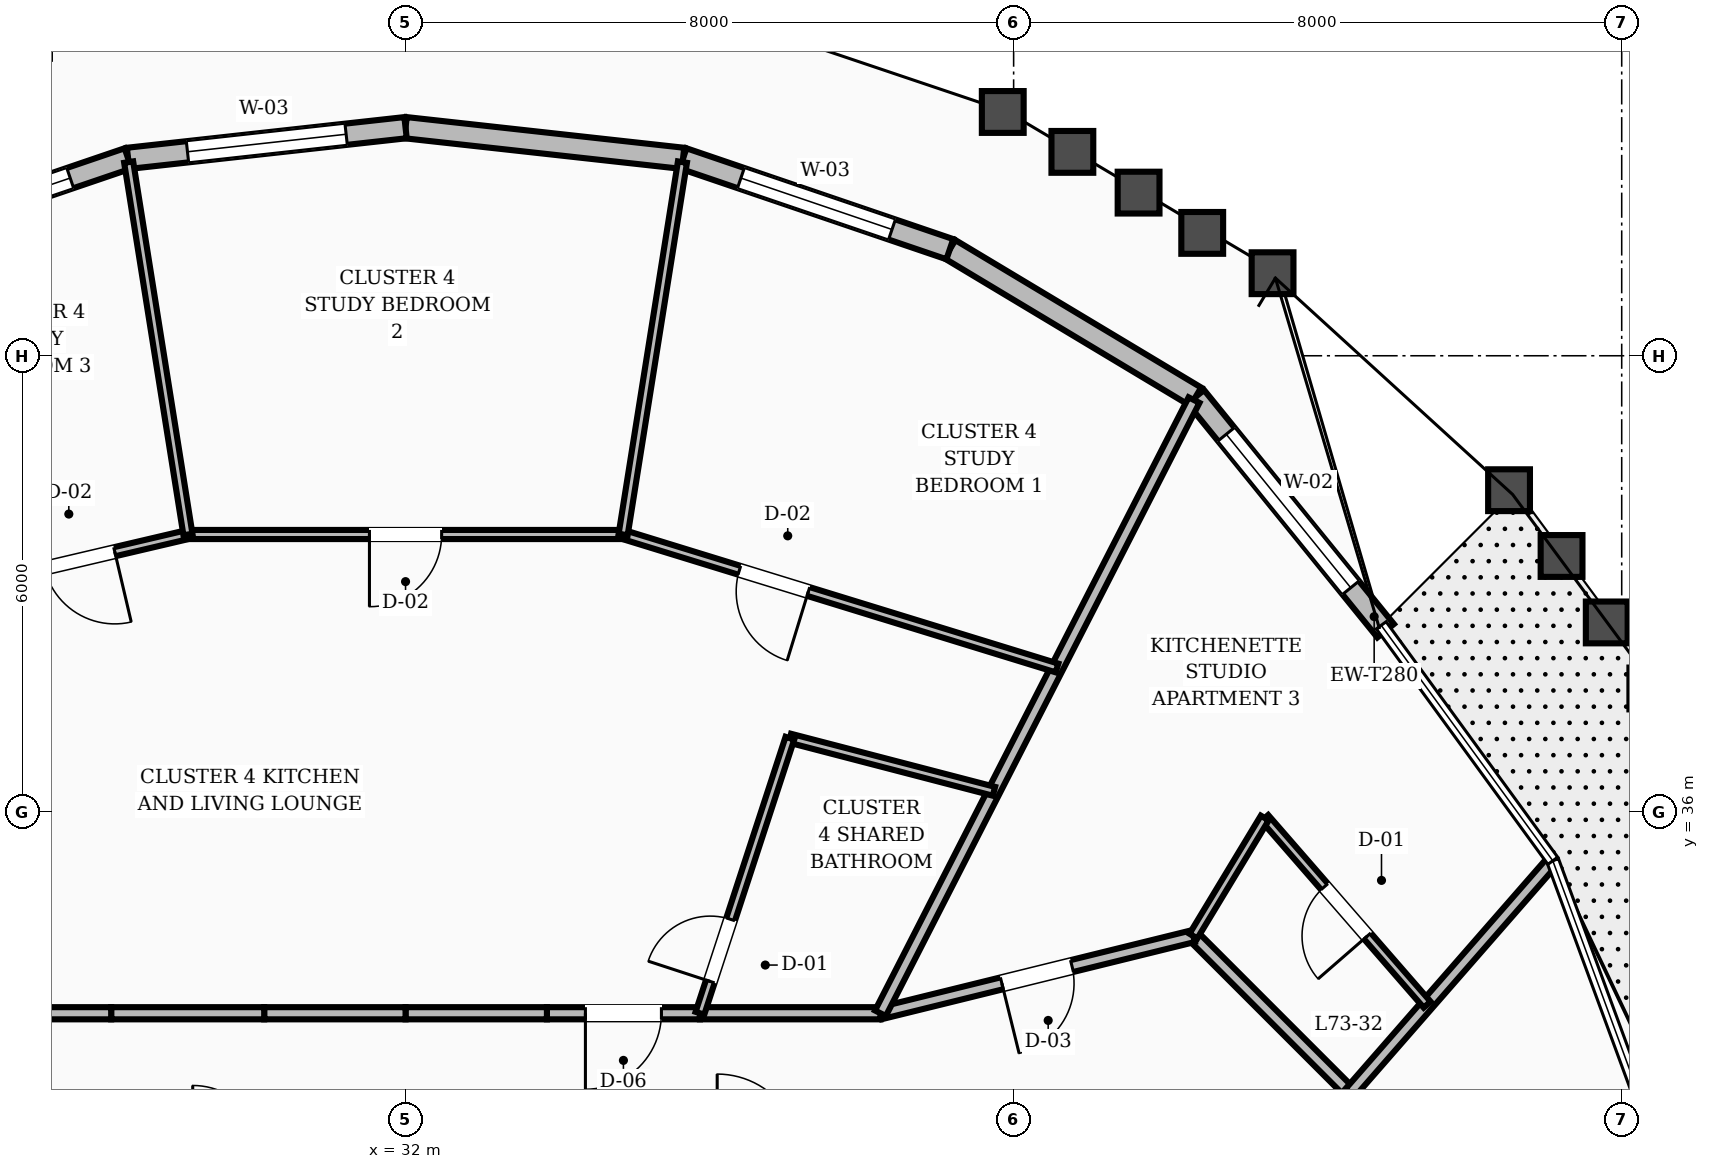
"""IFC4 building model, lengths in metres.
Left out: names, types, materials, properties, quantities, classifications, styles, units other than length and angle.
Written with IfcOpenShell. Run it as: python <this file> out.ifc"""

import sys

from ifc_helpers import new_model, si_unit, direction, frame, frame_2d, origin, place, context, subcontext, project, spatial, rectangle, extrude, element, fill, save


model = new_model("IFC4")
c1 = context("Model", 3, precision=1e-05, world=origin(), true_north=direction((0.0, 1.0)))
c2 = subcontext(c1, "Body", "Model", "MODEL_VIEW")
j1 = project(units=[si_unit("LENGTHUNIT", "METRE"), si_unit("PLANEANGLEUNIT", "RADIAN")], contexts=[c1])
p1 = place(None, origin())
s1 = spatial("IfcSite", under=j1, at=p1, CompositionType="ELEMENT")
p2 = place(p1, origin())
s2 = spatial("IfcBuilding", under=s1, at=p2, CompositionType="ELEMENT")
p3 = place(p2, frame((0.0, 0.0, 279.6)))
s3 = spatial("IfcBuildingStorey", under=s2, at=p3, CompositionType="ELEMENT", Elevation=279.6)
p4 = place(p3, frame((44.894, 38.382, 0.0), z_axis=(0.0, 0.0, 1.0), x_axis=(-0.629952569376, 0.776633607524, 0.0)))
e1 = element("IfcWall", 1, at=p4, inside=s3, PredefinedType="STANDARD", context=c2, shape_type="SweptSolid", body=[
    extrude(rectangle(XDim=3.965, YDim=0.28, at=frame_2d((1.982, 0.0))), origin(), (0.0, 0.0, 1.0), 2.88),
])
p5 = place(p4, frame((0.729, 0.0, 0.8)))
e2 = element("IfcOpeningElement", 2, at=p5, cuts=e1, PredefinedType="OPENING", context=c2, shape_type="SweptSolid", body=[
    extrude(rectangle(XDim=2.6, YDim=1.65, at=frame_2d((1.3, 0.825))), frame((0.0, 0.15, 0.0), z_axis=(0.0, -1.0, 0.0), x_axis=(1.0, 0.0, 0.0)), (0.0, 0.0, 1.0), 0.3),
])
p6 = place(p3, frame((42.396, 41.461, 0.0), z_axis=(0.0, 0.0, 1.0), x_axis=(-0.857555727465, 0.514391071357, 0.0)))
e3 = element("IfcWall", 3, at=p6, inside=s3, PredefinedType="STANDARD", context=c2, shape_type="SweptSolid", body=[
    extrude(rectangle(XDim=3.773, YDim=0.28, at=frame_2d((1.886, 0.0))), origin(), (0.0, 0.0, 1.0), 2.88),
])
p7 = place(p3, frame((39.161, 43.402, 0.0), z_axis=(0.0, 0.0, 1.0), x_axis=(-0.946642640744, 0.322285138854, 0.0)))
e4 = element("IfcWall", 4, at=p7, inside=s3, PredefinedType="STANDARD", context=c2, shape_type="SweptSolid", body=[
    extrude(rectangle(XDim=3.708, YDim=0.28, at=frame_2d((1.854, 0.0))), origin(), (0.0, 0.0, 1.0), 2.88),
])
p8 = place(p7, frame((0.804, 0.0, 0.8)))
e5 = element("IfcOpeningElement", 5, at=p8, cuts=e4, PredefinedType="OPENING", context=c2, shape_type="SweptSolid", body=[
    extrude(rectangle(XDim=2.1, YDim=1.65, at=frame_2d((1.05, 0.825))), frame((0.0, 0.15, 0.0), z_axis=(0.0, -1.0, 0.0), x_axis=(1.0, 0.0, 0.0)), (0.0, 0.0, 1.0), 0.3),
])
p9 = place(p3, frame((35.651, 44.597, 0.0), z_axis=(0.0, 0.0, 1.0), x_axis=(-0.993952444877, 0.10981137156, 0.0)))
e6 = element("IfcWall", 6, at=p9, inside=s3, PredefinedType="STANDARD", context=c2, shape_type="SweptSolid", body=[
    extrude(rectangle(XDim=3.673, YDim=0.28, at=frame_2d((1.836, 0.0))), origin(), (0.0, 0.0, 1.0), 2.88),
])
p10 = place(p3, frame((32.0, 45.0, 0.0), z_axis=(0.0, 0.0, 1.0), x_axis=(-0.993952444877, -0.10981137156, 0.0)))
e7 = element("IfcWall", 7, at=p10, inside=s3, PredefinedType="STANDARD", context=c2, shape_type="SweptSolid", body=[
    extrude(rectangle(XDim=3.673, YDim=0.28, at=frame_2d((1.836, 0.0))), origin(), (0.0, 0.0, 1.0), 2.88),
])
p11 = place(p10, frame((0.787, 0.0, 0.8)))
e8 = element("IfcOpeningElement", 8, at=p11, cuts=e7, PredefinedType="OPENING", context=c2, shape_type="SweptSolid", body=[
    extrude(rectangle(XDim=2.1, YDim=1.65, at=frame_2d((1.05, 0.825))), frame((0.0, 0.15, 0.0), z_axis=(0.0, -1.0, 0.0), x_axis=(1.0, 0.0, 0.0)), (0.0, 0.0, 1.0), 0.3),
])
p12 = place(p3, frame((28.349, 44.597, 0.0), z_axis=(0.0, 0.0, 1.0), x_axis=(-0.946642640744, -0.322285138854, 0.0)))
e9 = element("IfcWall", 9, at=p12, inside=s3, PredefinedType="STANDARD", context=c2, shape_type="SweptSolid", body=[
    extrude(rectangle(XDim=3.708, YDim=0.28, at=frame_2d((1.854, 0.0))), origin(), (0.0, 0.0, 1.0), 2.88),
])
p13 = place(p12, frame((0.804, 0.0, 0.8)))
e10 = element("IfcOpeningElement", 10, at=p13, cuts=e9, PredefinedType="OPENING", context=c2, shape_type="SweptSolid", body=[
    extrude(rectangle(XDim=2.1, YDim=1.65, at=frame_2d((1.05, 0.825))), frame((0.0, 0.15, 0.0), z_axis=(0.0, -1.0, 0.0), x_axis=(1.0, 0.0, 0.0)), (0.0, 0.0, 1.0), 0.3),
])
p14 = place(p3, frame((44.427, 32.303, 0.0), z_axis=(0.0, 0.0, 1.0), x_axis=(-0.707106781187, 0.707106781187, 0.0)))
e11 = element("IfcWall", 11, at=p14, inside=s3, PredefinedType="SOLIDWALL", context=c2, shape_type="SweptSolid", body=[
    extrude(rectangle(XDim=2.916, YDim=0.16, at=frame_2d((1.458, 0.0))), origin(), (0.0, 0.0, 1.0), 2.87),
])
p15 = place(p3, frame((42.365, 34.365, 0.0), z_axis=(0.0, 0.0, 1.0), x_axis=(-0.970939799552, -0.239323850978, 0.0)))
e12 = element("IfcWall", 12, at=p15, inside=s3, PredefinedType="SOLIDWALL", context=c2, shape_type="SweptSolid", body=[
    extrude(rectangle(XDim=4.241, YDim=0.16, at=frame_2d((2.12, 0.0))), origin(), (0.0, 0.0, 1.0), 2.87),
])
p16 = place(p15, frame((1.646, 0.0, 0.0)))
e13 = element("IfcOpeningElement", 13, at=p16, cuts=e12, PredefinedType="OPENING", context=c2, shape_type="SweptSolid", body=[
    extrude(rectangle(XDim=0.95, YDim=2.1, at=frame_2d((0.475, 1.05))), frame((0.0, 0.09, 0.0), z_axis=(0.0, -1.0, 0.0), x_axis=(1.0, 0.0, 0.0)), (0.0, 0.0, 1.0), 0.18),
])
p17 = place(p3, frame((38.248, 33.35, 0.0), z_axis=(0.0, 0.0, 1.0), x_axis=(-1.0, 0.0, 0.0)))
e14 = element("IfcWall", 14, at=p17, inside=s3, PredefinedType="SOLIDWALL", context=c2, shape_type="SweptSolid", body=[
    extrude(rectangle(XDim=2.375, YDim=0.16, at=frame_2d((1.188, 0.0))), origin(), (0.0, 0.0, 1.0), 2.87),
])
p18 = place(p3, frame((35.873, 33.35, 0.0), z_axis=(0.0, 0.0, 1.0), x_axis=(-1.0, 0.0, 0.0)))
e15 = element("IfcWall", 15, at=p18, inside=s3, PredefinedType="SOLIDWALL", context=c2, shape_type="SweptSolid", body=[
    extrude(rectangle(XDim=2.013, YDim=0.16, at=frame_2d((1.006, 0.0))), origin(), (0.0, 0.0, 1.0), 2.87),
])
p19 = place(p18, frame((0.507, 0.0, 0.0)))
e16 = element("IfcOpeningElement", 16, at=p19, cuts=e15, PredefinedType="OPENING", context=c2, shape_type="SweptSolid", body=[
    extrude(rectangle(XDim=1.0, YDim=2.1, at=frame_2d((0.5, 1.05))), frame((0.0, 0.09, 0.0), z_axis=(0.0, -1.0, 0.0), x_axis=(1.0, 0.0, 0.0)), (0.0, 0.0, 1.0), 0.18),
])
for number, where, z_axis, x_axis in (
    (17, (33.86, 33.35, 0.0), (0.0, 0.0, 1.0), (-1.0, 0.0, 0.0)),
    (18, (32.0, 33.35, 0.0), (0.0, 0.0, 1.0), (-1.0, 0.0, 0.0)),
):
    element("IfcWall", number, at=place(p3, frame(where, z_axis=z_axis, x_axis=x_axis)), inside=s3, PredefinedType="SOLIDWALL", context=c2, shape_type="SweptSolid", body=[
        extrude(rectangle(XDim=1.86, YDim=0.16, at=frame_2d((0.93, 0.0))), origin(), (0.0, 0.0, 1.0), 2.87),
    ])
p20 = place(p3, frame((30.14, 33.35, 0.0), z_axis=(0.0, 0.0, 1.0), x_axis=(-1.0, 0.0, 0.0)))
e19 = element("IfcWall", 19, at=p20, inside=s3, PredefinedType="SOLIDWALL", context=c2, shape_type="SweptSolid", body=[
    extrude(rectangle(XDim=2.013, YDim=0.16, at=frame_2d((1.006, 0.0))), origin(), (0.0, 0.0, 1.0), 2.87),
])
p21 = place(p3, frame((28.127, 33.35, 0.0), z_axis=(0.0, 0.0, 1.0), x_axis=(-1.0, 0.0, 0.0)))
e20 = element("IfcWall", 20, at=p21, inside=s3, PredefinedType="SOLIDWALL", context=c2, shape_type="SweptSolid", body=[
    extrude(rectangle(XDim=2.375, YDim=0.16, at=frame_2d((1.188, 0.0))), origin(), (0.0, 0.0, 1.0), 2.87),
])
p22 = place(p3, frame((44.427, 32.303, 0.0), z_axis=(0.0, 0.0, 1.0), x_axis=(0.657843835953, 0.753154358348, 0.0)))
e21 = element("IfcWall", 21, at=p22, inside=s3, PredefinedType="SOLIDWALL", context=c2, shape_type="SweptSolid", body=[
    extrude(rectangle(XDim=4.004, YDim=0.16, at=frame_2d((2.002, 0.0))), origin(), (0.0, 0.0, 1.0), 2.87),
])
p23 = place(p3, frame((45.44, 33.463, 0.0), z_axis=(0.0, 0.0, 1.0), x_axis=(-0.656340285245, 0.754464995851, 0.0)))
e22 = element("IfcWall", 22, at=p23, inside=s3, PredefinedType="PARTITIONING", context=c2, shape_type="SweptSolid", body=[
    extrude(rectangle(XDim=3.254, YDim=0.12, at=frame_2d((1.627, 0.0))), origin(), (0.0, 0.0, 1.0), 2.87),
])
p24 = place(p23, frame((1.197, 0.0, 0.0)))
e23 = element("IfcOpeningElement", 23, at=p24, cuts=e22, PredefinedType="OPENING", context=c2, shape_type="SweptSolid", body=[
    extrude(rectangle(XDim=0.86, YDim=2.1, at=frame_2d((0.43, 1.05))), frame((0.0, 0.07, 0.0), z_axis=(0.0, -1.0, 0.0), x_axis=(1.0, 0.0, 0.0)), (0.0, 0.0, 1.0), 0.14),
])
p25 = place(p3, frame((42.365, 34.365, 0.0), z_axis=(0.0, 0.0, 1.0), x_axis=(0.517222367242, 0.855851051775, 0.0)))
e24 = element("IfcWall", 24, at=p25, inside=s3, PredefinedType="PARTITIONING", context=c2, shape_type="SweptSolid", body=[
    extrude(rectangle(XDim=1.815, YDim=0.12, at=frame_2d((0.908, 0.0))), origin(), (0.0, 0.0, 1.0), 2.87),
])
p26 = place(p3, frame((38.248, 33.35, 0.0), z_axis=(0.0, 0.0, 1.0), x_axis=(0.455343199474, 0.890315994854, 0.0)))
e25 = element("IfcWall", 25, at=p26, inside=s3, PredefinedType="SOLIDWALL", context=c2, shape_type="SweptSolid", body=[
    extrude(rectangle(XDim=9.061, YDim=0.16, at=frame_2d((4.53, 0.0))), origin(), (0.0, 0.0, 1.0), 2.87),
])
p27 = place(p3, frame((39.741, 36.27, 0.0), z_axis=(0.0, 0.0, 1.0), x_axis=(-0.967751731416, 0.251905907714, 0.0)))
e26 = element("IfcWall", 26, at=p27, inside=s3, PredefinedType="PARTITIONING", context=c2, shape_type="SweptSolid", body=[
    extrude(rectangle(XDim=2.774, YDim=0.12, at=frame_2d((1.387, 0.0))), origin(), (0.0, 0.0, 1.0), 2.87),
])
p28 = place(p3, frame((35.873, 33.35, 0.0), z_axis=(0.0, 0.0, 1.0), x_axis=(0.310932697292, 0.950431932205, 0.0)))
e27 = element("IfcWall", 27, at=p28, inside=s3, PredefinedType="PARTITIONING", context=c2, shape_type="SweptSolid", body=[
    extrude(rectangle(XDim=3.807, YDim=0.12, at=frame_2d((1.904, 0.0))), origin(), (0.0, 0.0, 1.0), 2.87),
])
p29 = place(p28, frame((0.44, 0.0, 0.0)))
e28 = element("IfcOpeningElement", 28, at=p29, cuts=e27, PredefinedType="OPENING", context=c2, shape_type="SweptSolid", body=[
    extrude(rectangle(XDim=0.86, YDim=2.1, at=frame_2d((0.43, 1.05))), frame((0.0, 0.07, 0.0), z_axis=(0.0, -1.0, 0.0), x_axis=(1.0, 0.0, 0.0)), (0.0, 0.0, 1.0), 0.14),
])
p30 = place(p3, frame((40.571, 37.892, 0.0), z_axis=(0.0, 0.0, 1.0), x_axis=(-0.955788731156, 0.294054249068, 0.0)))
e29 = element("IfcWall", 29, at=p30, inside=s3, PredefinedType="PARTITIONING", context=c2, shape_type="SweptSolid", body=[
    extrude(rectangle(XDim=5.972, YDim=0.12, at=frame_2d((2.986, 0.0))), origin(), (0.0, 0.0, 1.0), 2.87),
])
p31 = place(p30, frame((3.422, 0.0, 0.0)))
e30 = element("IfcOpeningElement", 30, at=p31, cuts=e29, PredefinedType="OPENING", context=c2, shape_type="SweptSolid", body=[
    extrude(rectangle(XDim=0.95, YDim=2.1, at=frame_2d((0.475, 1.05))), frame((0.0, 0.07, 0.0), z_axis=(0.0, -1.0, 0.0), x_axis=(1.0, 0.0, 0.0)), (0.0, 0.0, 1.0), 0.14),
])
p32 = place(p3, frame((34.863, 39.648, 0.0), z_axis=(0.0, 0.0, 1.0), x_axis=(-1.0, 0.0, 0.0)))
e31 = element("IfcWall", 31, at=p32, inside=s3, PredefinedType="PARTITIONING", context=c2, shape_type="SweptSolid", body=[
    extrude(rectangle(XDim=5.726, YDim=0.12, at=frame_2d((2.863, 0.0))), origin(), (0.0, 0.0, 1.0), 2.87),
])
p33 = place(p32, frame((2.388, 0.0, 0.0)))
e32 = element("IfcOpeningElement", 32, at=p33, cuts=e31, PredefinedType="OPENING", context=c2, shape_type="SweptSolid", body=[
    extrude(rectangle(XDim=0.95, YDim=2.1, at=frame_2d((0.475, 1.05))), frame((0.0, 0.07, 0.0), z_axis=(0.0, -1.0, 0.0), x_axis=(1.0, 0.0, 0.0)), (0.0, 0.0, 1.0), 0.14),
])
p34 = place(p3, frame((34.863, 39.648, 0.0), z_axis=(0.0, 0.0, 1.0), x_axis=(0.157236134309, 0.98756103511, 0.0)))
e33 = element("IfcWall", 33, at=p34, inside=s3, PredefinedType="PARTITIONING", context=c2, shape_type="SweptSolid", body=[
    extrude(rectangle(XDim=4.961, YDim=0.12, at=frame_2d((2.48, 0.0))), origin(), (0.0, 0.0, 1.0), 2.87),
])
p35 = place(p3, frame((29.137, 39.648, 0.0), z_axis=(0.0, 0.0, 1.0), x_axis=(-0.973528560289, -0.228565400489, 0.0)))
e34 = element("IfcWall", 34, at=p35, inside=s3, PredefinedType="PARTITIONING", context=c2, shape_type="SweptSolid", body=[
    extrude(rectangle(XDim=2.929, YDim=0.12, at=frame_2d((1.464, 0.0))), origin(), (0.0, 0.0, 1.0), 2.87),
])
p36 = place(p35, frame((0.99, 0.0, 0.0)))
e35 = element("IfcOpeningElement", 35, at=p36, cuts=e34, PredefinedType="OPENING", context=c2, shape_type="SweptSolid", body=[
    extrude(rectangle(XDim=0.95, YDim=2.1, at=frame_2d((0.475, 1.05))), frame((0.0, 0.07, 0.0), z_axis=(0.0, -1.0, 0.0), x_axis=(1.0, 0.0, 0.0)), (0.0, 0.0, 1.0), 0.14),
])
p37 = place(p3, frame((29.137, 39.648, 0.0), z_axis=(0.0, 0.0, 1.0), x_axis=(-0.157236134309, 0.98756103511, 0.0)))
e36 = element("IfcWall", 36, at=p37, inside=s3, PredefinedType="PARTITIONING", context=c2, shape_type="SweptSolid", body=[
    extrude(rectangle(XDim=4.961, YDim=0.12, at=frame_2d((2.48, 0.0))), origin(), (0.0, 0.0, 1.0), 2.87),
])
p38 = place(p5, origin())
e37 = element("IfcWindow", 37, at=p38, inside=s3, PartitioningType="SINGLE_PANEL", PredefinedType="WINDOW", context=c2, shape_type="SweptSolid", body=[
    extrude(rectangle(XDim=2.6, YDim=1.65, at=frame_2d((1.3, 0.825))), frame((0.0, 0.03, 0.0), z_axis=(0.0, -1.0, 0.0), x_axis=(1.0, 0.0, 0.0)), (0.0, 0.0, 1.0), 0.06),
])
fill(e2, e37)
p39 = place(p8, origin())
e38 = element("IfcWindow", 38, at=p39, inside=s3, PartitioningType="SINGLE_PANEL", PredefinedType="WINDOW", context=c2, shape_type="SweptSolid", body=[
    extrude(rectangle(XDim=2.1, YDim=1.65, at=frame_2d((1.05, 0.825))), frame((0.0, 0.03, 0.0), z_axis=(0.0, -1.0, 0.0), x_axis=(1.0, 0.0, 0.0)), (0.0, 0.0, 1.0), 0.06),
])
fill(e5, e38)
p40 = place(p11, origin())
e39 = element("IfcWindow", 39, at=p40, inside=s3, PartitioningType="SINGLE_PANEL", PredefinedType="WINDOW", context=c2, shape_type="SweptSolid", body=[
    extrude(rectangle(XDim=2.1, YDim=1.65, at=frame_2d((1.05, 0.825))), frame((0.0, 0.03, 0.0), z_axis=(0.0, -1.0, 0.0), x_axis=(1.0, 0.0, 0.0)), (0.0, 0.0, 1.0), 0.06),
])
fill(e8, e39)
p41 = place(p13, origin())
e40 = element("IfcWindow", 40, at=p41, inside=s3, PartitioningType="SINGLE_PANEL", PredefinedType="WINDOW", context=c2, shape_type="SweptSolid", body=[
    extrude(rectangle(XDim=2.1, YDim=1.65, at=frame_2d((1.05, 0.825))), frame((0.0, 0.03, 0.0), z_axis=(0.0, -1.0, 0.0), x_axis=(1.0, 0.0, 0.0)), (0.0, 0.0, 1.0), 0.06),
])
fill(e10, e40)
p42 = place(p24, origin())
e41 = element("IfcDoor", 41, at=p42, inside=s3, OperationType="SINGLE_SWING_LEFT", PredefinedType="DOOR", context=c2, shape_type="SweptSolid", body=[
    extrude(rectangle(XDim=0.86, YDim=2.1, at=frame_2d((0.43, 1.05))), frame((0.0, 0.025, 0.0), z_axis=(0.0, -1.0, 0.0), x_axis=(1.0, 0.0, 0.0)), (0.0, 0.0, 1.0), 0.05),
])
fill(e23, e41)
p43 = place(p16, origin())
e42 = element("IfcDoor", 42, at=p43, inside=s3, OperationType="SINGLE_SWING_RIGHT", PredefinedType="DOOR", context=c2, shape_type="SweptSolid", body=[
    extrude(rectangle(XDim=0.95, YDim=2.1, at=frame_2d((0.475, 1.05))), frame((0.0, 0.025, 0.0), z_axis=(0.0, -1.0, 0.0), x_axis=(1.0, 0.0, 0.0)), (0.0, 0.0, 1.0), 0.05),
])
fill(e13, e42)
p44 = place(p29, origin())
e43 = element("IfcDoor", 43, at=p44, inside=s3, OperationType="SINGLE_SWING_LEFT", PredefinedType="DOOR", context=c2, shape_type="SweptSolid", body=[
    extrude(rectangle(XDim=0.86, YDim=2.1, at=frame_2d((0.43, 1.05))), frame((0.0, 0.025, 0.0), z_axis=(0.0, -1.0, 0.0), x_axis=(1.0, 0.0, 0.0)), (0.0, 0.0, 1.0), 0.05),
])
fill(e28, e43)
p45 = place(p19, origin())
e44 = element("IfcDoor", 44, at=p45, inside=s3, OperationType="SINGLE_SWING_RIGHT", PredefinedType="DOOR", context=c2, shape_type="SweptSolid", body=[
    extrude(rectangle(XDim=1.0, YDim=2.1, at=frame_2d((0.5, 1.05))), frame((0.0, 0.025, 0.0), z_axis=(0.0, -1.0, 0.0), x_axis=(1.0, 0.0, 0.0)), (0.0, 0.0, 1.0), 0.05),
])
fill(e16, e44)
p46 = place(p31, origin())
e45 = element("IfcDoor", 45, at=p46, inside=s3, OperationType="SINGLE_SWING_LEFT", PredefinedType="DOOR", context=c2, shape_type="SweptSolid", body=[
    extrude(rectangle(XDim=0.95, YDim=2.1, at=frame_2d((0.475, 1.05))), frame((0.0, 0.025, 0.0), z_axis=(0.0, -1.0, 0.0), x_axis=(1.0, 0.0, 0.0)), (0.0, 0.0, 1.0), 0.05),
])
fill(e30, e45)
p47 = place(p33, origin())
e46 = element("IfcDoor", 46, at=p47, inside=s3, OperationType="SINGLE_SWING_RIGHT", PredefinedType="DOOR", context=c2, shape_type="SweptSolid", body=[
    extrude(rectangle(XDim=0.95, YDim=2.1, at=frame_2d((0.475, 1.05))), frame((0.0, 0.025, 0.0), z_axis=(0.0, -1.0, 0.0), x_axis=(1.0, 0.0, 0.0)), (0.0, 0.0, 1.0), 0.05),
])
fill(e32, e46)
p48 = place(p36, origin())
e47 = element("IfcDoor", 47, at=p48, inside=s3, OperationType="SINGLE_SWING_LEFT", PredefinedType="DOOR", context=c2, shape_type="SweptSolid", body=[
    extrude(rectangle(XDim=0.95, YDim=2.1, at=frame_2d((0.475, 1.05))), frame((0.0, 0.025, 0.0), z_axis=(0.0, -1.0, 0.0), x_axis=(1.0, 0.0, 0.0)), (0.0, 0.0, 1.0), 0.05),
])
fill(e35, e47)
save(model, sys.argv[1])
